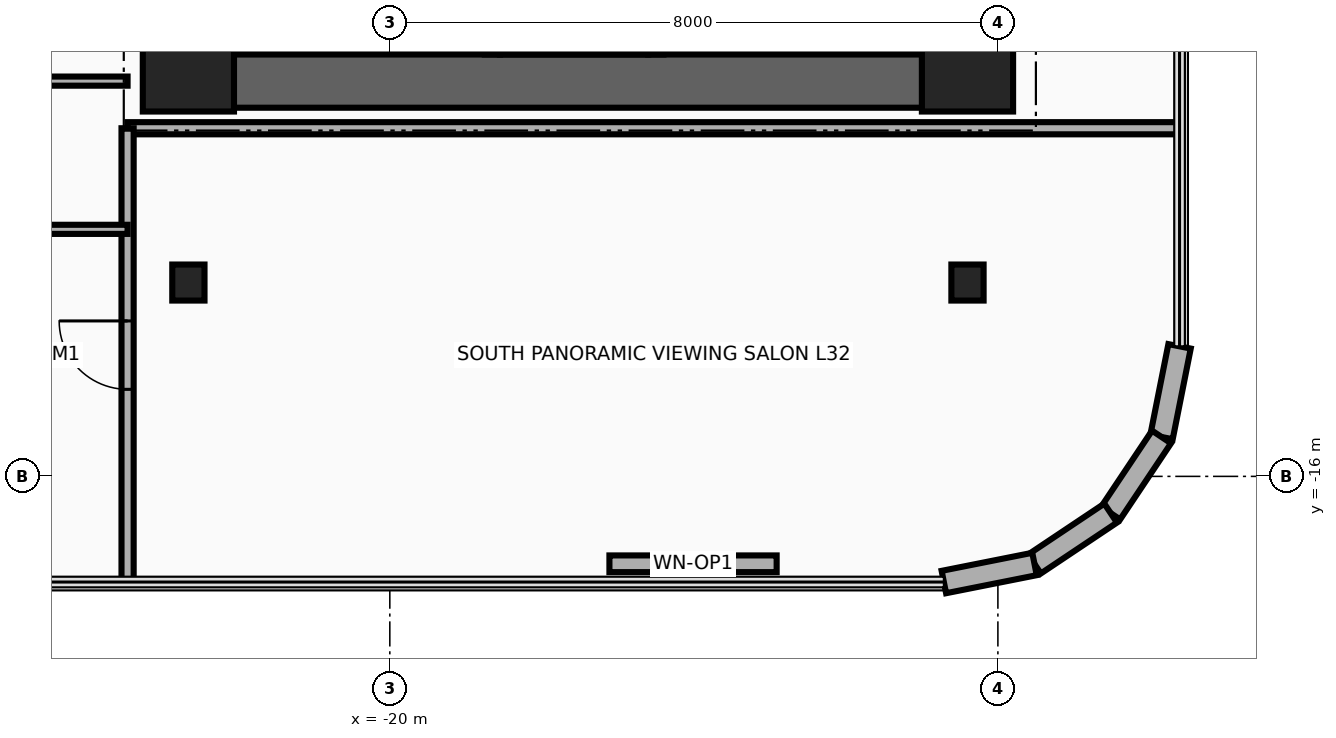
"""IFC4 building model, lengths in metres.
Left out: names, types, materials, properties, quantities, classifications, styles, units other than length and angle.
Written with IfcOpenShell. Run it as: python <this file> out.ifc"""

import sys

from ifc_helpers import new_model, si_unit, direction, frame, frame_2d, origin, origin_2d, place, context, subcontext, project, spatial, rectangle, i_section, extrude, source, transform, mapped, element, fill, save


model = new_model("IFC4")
c1 = context("Model", 3, precision=1e-05, world=origin(), true_north=direction((0.0, 1.0)))
c2 = subcontext(c1, "Body", "Model", "MODEL_VIEW")
j1 = project(units=[si_unit("LENGTHUNIT", "METRE"), si_unit("PLANEANGLEUNIT", "RADIAN")], contexts=[c1])
p1 = place(None, origin())
s1 = spatial("IfcSite", under=j1, at=p1, CompositionType="ELEMENT")
p2 = place(p1, origin())
s2 = spatial("IfcBuilding", under=s1, at=p2, CompositionType="ELEMENT")
p3 = place(p2, frame((0.0, 0.0, 127.9)))
s3 = spatial("IfcBuildingStorey", under=s2, at=p3, CompositionType="ELEMENT", Elevation=127.9)
for number, where, z_axis, x_axis in (
    (1, (-22.16, -10.45, 0.0), (0.0, 0.0, 1.0), (0.0, 1.0, 0.0)),
    (2, (-18.83, -10.45, 0.0), (0.0, 0.0, 1.0), (0.0, 1.0, 0.0)),
):
    element("IfcWall", number, at=place(p3, frame(where, z_axis=z_axis, x_axis=x_axis)), inside=s3, PredefinedType="SHEAR", context=c2, shape_type="SweptSolid", body=[
        extrude(rectangle(XDim=8.67, YDim=0.22, at=frame_2d((4.335, 0.0))), origin(), (0.0, 0.0, 1.0), 3.46),
    ])
p4 = place(p3, frame((-22.65, -11.15, 0.0), z_axis=(0.0, 0.0, 1.0), x_axis=(0.0, 1.0, 0.0)))
e3 = element("IfcWall", 3, at=p4, inside=s3, PredefinedType="SHEAR", context=c2, shape_type="SweptSolid", body=[
    extrude(rectangle(XDim=22.3, YDim=0.7, at=frame_2d((11.15, 0.0))), origin(), (0.0, 0.0, 1.0), 3.46),
])
p5 = place(p3, frame((-22.65, -10.8, 0.0), z_axis=(0.0, 0.0, 1.0), x_axis=(1.0, 0.0, 0.0)))
e4 = element("IfcWall", 4, at=p5, inside=s3, PredefinedType="SHEAR", context=c2, shape_type="SweptSolid", body=[
    extrude(rectangle(XDim=10.25, YDim=0.7, at=frame_2d((5.125, 0.0))), origin(), (0.0, 0.0, 1.0), 3.46),
])
m1 = source(origin(), c2, "Body", "SweptSolid", [
    extrude(rectangle(XDim=1.2, YDim=1.2, at=origin_2d()), origin(), (0.0, 0.0, 1.0), 3.7),
])
for number, where, z_axis, x_axis in (
    (5, (-22.65, -10.6, 0.0), (0.0, 0.0, 1.0), (1.0, 0.0, 0.0)),
    (6, (-12.4, -10.6, 0.0), (0.0, 0.0, 1.0), (1.0, 0.0, 0.0)),
):
    element("IfcColumn", number, at=place(p3, frame(where, z_axis=z_axis, x_axis=x_axis)), inside=s3, PredefinedType="COLUMN", context=c2, shape_type="MappedRepresentation", body=[
        mapped(m1, transform((0.0, 0.0, 0.0), x_axis=(1.0, 0.0, 0.0), y_axis=(0.0, 1.0, 0.0), z_axis=(0.0, 0.0, 1.0), scale=1.0)),
    ])
m2 = source(origin(), c2, "Body", "SweptSolid", [
    extrude(i_section(OverallWidth=0.424, OverallDepth=0.474, WebThickness=0.048, FlangeThickness=0.077, at=origin_2d()), origin(), (0.0, 0.0, 1.0), 3.7),
])
for number, where, z_axis, x_axis in (
    (7, (-22.65, -13.45, 0.0), (0.0, 0.0, 1.0), (1.0, 0.0, 0.0)),
    (8, (-12.4, -13.45, 0.0), (0.0, 0.0, 1.0), (1.0, 0.0, 0.0)),
):
    element("IfcColumn", number, at=place(p3, frame(where, z_axis=z_axis, x_axis=x_axis)), inside=s3, PredefinedType="COLUMN", context=c2, shape_type="MappedRepresentation", body=[
        mapped(m2, transform((0.0, 0.0, 0.0), x_axis=(1.0, 0.0, 0.0), y_axis=(0.0, 1.0, 0.0), z_axis=(0.0, 0.0, 1.0), scale=1.0)),
    ])
p6 = place(p3, frame((-9.61, -14.289, 0.0), z_axis=(0.0, 0.0, 1.0), x_axis=(-0.194996050505, -0.980804027463, 0.0)))
e9 = element("IfcWall", 9, at=p6, inside=s3, PredefinedType="SOLIDWALL", context=c2, shape_type="SweptSolid", body=[
    extrude(rectangle(XDim=1.216, YDim=0.3, at=frame_2d((0.608, 0.0))), origin(), (0.0, 0.0, 1.0), 3.46),
])
for number, where, z_axis, x_axis in (
    (10, (-9.847, -15.482, 0.0), (0.0, 0.0, 1.0), (-0.556, -0.831, 0.0)),
    (11, (-10.517, -16.483, 0.0), (0.0, 0.0, 1.0), (-0.831, -0.556, 0.0)),
):
    element("IfcWall", number, at=place(p3, frame(where, z_axis=z_axis, x_axis=x_axis)), inside=s3, PredefinedType="SOLIDWALL", context=c2, shape_type="SweptSolid", body=[
        extrude(rectangle(XDim=1.205, YDim=0.3, at=frame_2d((0.603, 0.0))), origin(), (0.0, 0.0, 1.0), 3.46),
    ])
p7 = place(p3, frame((-11.518, -17.153, 0.0), z_axis=(0.0, 0.0, 1.0), x_axis=(-0.980804027463, -0.194996050505, 0.0)))
e12 = element("IfcWall", 12, at=p7, inside=s3, PredefinedType="SOLIDWALL", context=c2, shape_type="SweptSolid", body=[
    extrude(rectangle(XDim=1.216, YDim=0.3, at=frame_2d((0.608, 0.0))), origin(), (0.0, 0.0, 1.0), 3.46),
])
p8 = place(p3, frame((-14.911, -17.15, 0.0), z_axis=(0.0, 0.0, 1.0), x_axis=(-1.0, 0.0, 0.0)))
e13 = element("IfcWall", 13, at=p8, inside=s3, PredefinedType="SOLIDWALL", context=c2, shape_type="SweptSolid", body=[
    extrude(rectangle(XDim=2.2, YDim=0.22, at=frame_2d((1.1, 0.0))), origin(), (0.0, 0.0, 1.0), 3.46),
])
p9 = place(p8, frame((0.65, 0.0, 0.95)))
e14 = element("IfcOpeningElement", 14, at=p9, cuts=e13, PredefinedType="OPENING", context=c2, shape_type="SweptSolid", body=[
    extrude(rectangle(XDim=0.9, YDim=1.3, at=frame_2d((0.45, 0.65))), frame((0.0, 0.125, 0.0), z_axis=(0.0, -1.0, 0.0), x_axis=(1.0, 0.0, 0.0)), (0.0, 0.0, 1.0), 0.25),
])
for number, where, z_axis, x_axis in (
    (15, (-18.65, -10.45, 0.0), (0.0, 0.0, 1.0), (0.0, 1.0, 0.0)),
    (16, (-16.5, -10.45, 0.0), (0.0, 0.0, 1.0), (0.0, 1.0, 0.0)),
):
    element("IfcWall", number, at=place(p3, frame(where, z_axis=z_axis, x_axis=x_axis)), inside=s3, PredefinedType="MOVABLE", context=c2, shape_type="SweptSolid", body=[
        extrude(rectangle(XDim=2.35, YDim=0.2, at=frame_2d((1.175, 0.0))), origin(), (0.0, 0.0, 1.0), 2.666),
    ])
p10 = place(p3, frame((-18.55, -10.35, 0.0), z_axis=(0.0, 0.0, 1.0), x_axis=(1.0, 0.0, 0.0)))
e17 = element("IfcWall", 17, at=p10, inside=s3, PredefinedType="MOVABLE", context=c2, shape_type="SweptSolid", body=[
    extrude(rectangle(XDim=1.95, YDim=0.2, at=frame_2d((0.975, 0.0))), origin(), (0.0, 0.0, 1.0), 2.666),
])
p11 = place(p3, frame((-23.45, -11.42, 0.0), z_axis=(0.0, 0.0, 1.0), x_axis=(1.0, 0.0, 0.0)))
e18 = element("IfcWall", 18, at=p11, inside=s3, PredefinedType="PARTITIONING", context=c2, shape_type="SweptSolid", body=[
    extrude(rectangle(XDim=13.84, YDim=0.16, at=frame_2d((6.92, 0.0))), origin(), (0.0, 0.0, 1.0), 2.834),
])
p12 = place(p3, frame((-23.45, -17.39, 0.0), z_axis=(0.0, 0.0, 1.0), x_axis=(0.0, 1.0, 0.0)))
e19 = element("IfcWall", 19, at=p12, inside=s3, PredefinedType="PARTITIONING", context=c2, shape_type="SweptSolid", body=[
    extrude(rectangle(XDim=5.97, YDim=0.16, at=frame_2d((2.985, 0.0))), origin(), (0.0, 0.0, 1.0), 3.46),
])
p13 = place(p12, frame((2.535, 0.0, 0.0)))
e20 = element("IfcOpeningElement", 20, at=p13, cuts=e19, PredefinedType="OPENING", context=c2, shape_type="SweptSolid", body=[
    extrude(rectangle(XDim=0.9, YDim=2.1, at=frame_2d((0.45, 1.05))), frame((0.0, 0.095, 0.0), z_axis=(0.0, -1.0, 0.0), x_axis=(1.0, 0.0, 0.0)), (0.0, 0.0, 1.0), 0.19),
])
p14 = place(p3, frame((-26.708, -10.8, 0.0), z_axis=(0.0, 0.0, 1.0), x_axis=(1.0, 0.0, 0.0)))
e21 = element("IfcWall", 21, at=p14, inside=s3, PredefinedType="PARTITIONING", context=c2, shape_type="SweptSolid", body=[
    extrude(rectangle(XDim=3.259, YDim=0.12, at=frame_2d((1.629, 0.0))), origin(), (0.0, 0.0, 1.0), 2.666),
])
p15 = place(p3, frame((-26.708, -12.75, 0.0), z_axis=(0.0, 0.0, 1.0), x_axis=(1.0, 0.0, 0.0)))
e22 = element("IfcWall", 22, at=p15, inside=s3, PredefinedType="PARTITIONING", context=c2, shape_type="SweptSolid", body=[
    extrude(rectangle(XDim=3.259, YDim=0.12, at=frame_2d((1.629, 0.0))), origin(), (0.0, 0.0, 1.0), 3.46),
])
p16 = place(p9, origin())
e23 = element("IfcWindow", 23, at=p16, inside=s3, PartitioningType="SINGLE_PANEL", PredefinedType="WINDOW", context=c2, shape_type="SweptSolid", body=[
    extrude(rectangle(XDim=0.9, YDim=1.3, at=frame_2d((0.45, 0.65))), frame((0.0, 0.03, 0.0), z_axis=(0.0, -1.0, 0.0), x_axis=(1.0, 0.0, 0.0)), (0.0, 0.0, 1.0), 0.06),
])
fill(e14, e23)
p17 = place(p13, origin())
e24 = element("IfcDoor", 24, at=p17, inside=s3, OperationType="SINGLE_SWING_RIGHT", PredefinedType="DOOR", context=c2, shape_type="SweptSolid", body=[
    extrude(rectangle(XDim=0.9, YDim=2.1, at=frame_2d((0.45, 1.05))), frame((0.0, 0.025, 0.0), z_axis=(0.0, -1.0, 0.0), x_axis=(1.0, 0.0, 0.0)), (0.0, 0.0, 1.0), 0.05),
])
fill(e20, e24)
save(model, sys.argv[1])
